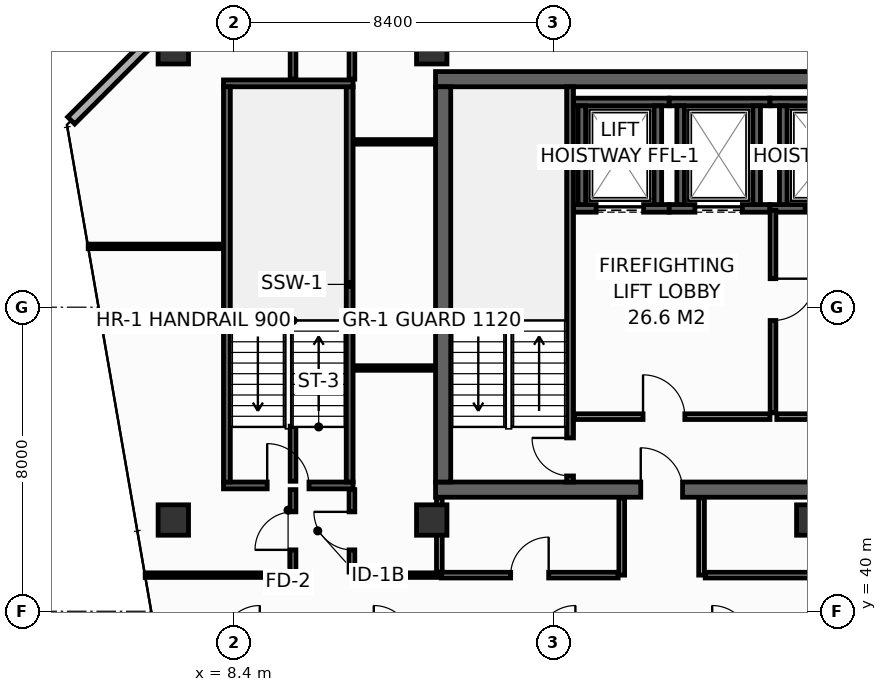
"""IFC4 building model, lengths in metres.
Left out: names, types, materials, properties, quantities, classifications, styles, units other than length and angle.
Written with IfcOpenShell. Run it as: python <this file> out.ifc"""

import sys

from ifc_helpers import new_model, si_unit, direction, frame, frame_2d, origin, origin_2d, place, context, subcontext, project, spatial, rectangle, hollow_rectangle, extrude, element, fill, save


model = new_model("IFC4")
c1 = context("Model", 3, precision=1e-05, world=origin(), true_north=direction((0.0, 1.0)))
c2 = subcontext(c1, "Body", "Model", "MODEL_VIEW")
j1 = project(units=[si_unit("LENGTHUNIT", "METRE"), si_unit("PLANEANGLEUNIT", "RADIAN")], contexts=[c1])
p1 = place(None, origin())
s1 = spatial("IfcSite", under=j1, at=p1, CompositionType="ELEMENT")
p2 = place(p1, origin())
s2 = spatial("IfcBuilding", under=s1, at=p2, CompositionType="ELEMENT")
p3 = place(p2, frame((0.0, 0.0, 234.4)))
s3 = spatial("IfcBuildingStorey", under=s2, at=p3, CompositionType="ELEMENT", Elevation=234.4)
p4 = place(p3, frame((13.7, 43.2, 0.0), z_axis=(0.0, 0.0, 1.0), x_axis=(1.0, 0.0, 0.0)))
e1 = element("IfcWall", 1, at=p4, inside=s3, PredefinedType="SHEAR", context=c2, shape_type="SweptSolid", body=[
    extrude(rectangle(XDim=32.5, YDim=0.4, at=frame_2d((16.25, 0.0))), origin(), (0.0, 0.0, 1.0), 3.55),
])
p5 = place(p4, frame((5.4, 0.0, 0.0)))
e2 = element("IfcOpeningElement", 2, at=p5, cuts=e1, PredefinedType="OPENING", context=c2, shape_type="SweptSolid", body=[
    extrude(rectangle(XDim=1.1, YDim=2.15, at=frame_2d((0.55, 1.075))), frame((0.0, 0.21, 0.0), z_axis=(0.0, -1.0, 0.0), x_axis=(1.0, 0.0, 0.0)), (0.0, 0.0, 1.0), 0.42),
])
p6 = place(p4, frame((25.6, 0.0, 0.0)))
e3 = element("IfcOpeningElement", 3, at=p6, cuts=e1, PredefinedType="OPENING", context=c2, shape_type="SweptSolid", body=[
    extrude(rectangle(XDim=1.1, YDim=2.15, at=frame_2d((0.55, 1.075))), frame((0.0, 0.21, 0.0), z_axis=(0.0, -1.0, 0.0), x_axis=(1.0, 0.0, 0.0)), (0.0, 0.0, 1.0), 0.42),
])
p7 = place(p3, frame((13.7, 54.0, 0.0), z_axis=(0.0, 0.0, 1.0), x_axis=(1.0, 0.0, 0.0)))
e4 = element("IfcWall", 4, at=p7, inside=s3, PredefinedType="SHEAR", context=c2, shape_type="SweptSolid", body=[
    extrude(rectangle(XDim=32.5, YDim=0.4, at=frame_2d((16.25, 0.0))), origin(), (0.0, 0.0, 1.0), 3.55),
])
p8 = place(p3, frame((13.9, 43.4, 0.0), z_axis=(0.0, 0.0, 1.0), x_axis=(0.0, 1.0, 0.0)))
e5 = element("IfcWall", 5, at=p8, inside=s3, PredefinedType="SHEAR", context=c2, shape_type="SweptSolid", body=[
    extrude(rectangle(XDim=10.4, YDim=0.4, at=frame_2d((5.2, 0.0))), origin(), (0.0, 0.0, 1.0), 3.55),
])
for number, where, z_axis, x_axis in (
    (6, (6.8, 54.8, 0.0), (0.0, 0.0, 1.0), (1.0, 0.0, 0.0)),
    (7, (13.6, 54.8, 0.0), (0.0, 0.0, 1.0), (1.0, 0.0, 0.0)),
    (8, (6.8, 42.4, 0.0), (0.0, 0.0, 1.0), (1.0, 0.0, 0.0)),
    (9, (13.6, 42.4, 0.0), (0.0, 0.0, 1.0), (1.0, 0.0, 0.0)),
    (10, (23.6, 42.4, 0.0), (0.0, 0.0, 1.0), (1.0, 0.0, 0.0)),
):
    element("IfcColumn", number, at=place(p3, frame(where, z_axis=z_axis, x_axis=x_axis)), inside=s3, PredefinedType="COLUMN", context=c2, shape_type="SweptSolid", body=[
        extrude(hollow_rectangle(XDim=0.8, YDim=0.8, WallThickness=0.036, at=origin_2d()), origin(), (0.0, 0.0, 1.0), 3.8),
    ])
p9 = place(p3, frame((17.33, 50.6, 0.0), z_axis=(0.0, 0.0, 1.0), x_axis=(1.0, 0.0, 0.0)))
e11 = element("IfcWall", 11, at=p9, inside=s3, PredefinedType="SHEAR", context=c2, shape_type="SweptSolid", body=[
    extrude(rectangle(XDim=2.52, YDim=0.2, at=frame_2d((1.26, 0.0))), origin(), (0.0, 0.0, 1.0), 3.55),
])
p10 = place(p9, frame((0.595, 0.0, 0.0)))
e12 = element("IfcOpeningElement", 12, at=p10, cuts=e11, PredefinedType="OPENING", context=c2, shape_type="SweptSolid", body=[
    extrude(rectangle(XDim=1.25, YDim=2.3, at=frame_2d((0.625, 1.15))), frame((0.0, 0.11, 0.0), z_axis=(0.0, -1.0, 0.0), x_axis=(1.0, 0.0, 0.0)), (0.0, 0.0, 1.0), 0.22),
])
p11 = place(p3, frame((17.33, 53.4, 0.0), z_axis=(0.0, 0.0, 1.0), x_axis=(1.0, 0.0, 0.0)))
e13 = element("IfcWall", 13, at=p11, inside=s3, PredefinedType="SHEAR", context=c2, shape_type="SweptSolid", body=[
    extrude(rectangle(XDim=2.52, YDim=0.2, at=frame_2d((1.26, 0.0))), origin(), (0.0, 0.0, 1.0), 3.55),
])
for number, where, z_axis, x_axis in (
    (14, (17.55, 50.7, 0.0), (0.0, 0.0, 1.0), (0.0, 1.0, 0.0)),
    (15, (19.55, 50.7, 0.0), (0.0, 0.0, 1.0), (0.0, 1.0, 0.0)),
):
    element("IfcWall", number, at=place(p3, frame(where, z_axis=z_axis, x_axis=x_axis)), inside=s3, PredefinedType="SHEAR", context=c2, shape_type="SweptSolid", body=[
        extrude(rectangle(XDim=2.6, YDim=0.2, at=frame_2d((1.3, 0.0))), origin(), (0.0, 0.0, 1.0), 3.55),
    ])
p12 = place(p3, frame((19.85, 50.6, 0.0), z_axis=(0.0, 0.0, 1.0), x_axis=(1.0, 0.0, 0.0)))
e16 = element("IfcWall", 16, at=p12, inside=s3, PredefinedType="SHEAR", context=c2, shape_type="SweptSolid", body=[
    extrude(rectangle(XDim=2.65, YDim=0.2, at=frame_2d((1.325, 0.0))), origin(), (0.0, 0.0, 1.0), 3.55),
])
p13 = place(p12, frame((0.675, 0.0, 0.0)))
e17 = element("IfcOpeningElement", 17, at=p13, cuts=e16, PredefinedType="OPENING", context=c2, shape_type="SweptSolid", body=[
    extrude(rectangle(XDim=1.25, YDim=2.3, at=frame_2d((0.625, 1.15))), frame((0.0, 0.11, 0.0), z_axis=(0.0, -1.0, 0.0), x_axis=(1.0, 0.0, 0.0)), (0.0, 0.0, 1.0), 0.22),
])
p14 = place(p3, frame((19.85, 53.4, 0.0), z_axis=(0.0, 0.0, 1.0), x_axis=(1.0, 0.0, 0.0)))
e18 = element("IfcWall", 18, at=p14, inside=s3, PredefinedType="SHEAR", context=c2, shape_type="SweptSolid", body=[
    extrude(rectangle(XDim=2.65, YDim=0.2, at=frame_2d((1.325, 0.0))), origin(), (0.0, 0.0, 1.0), 3.55),
])
for number, where, z_axis, x_axis in (
    (19, (20.15, 50.7, 0.0), (0.0, 0.0, 1.0), (0.0, 1.0, 0.0)),
    (20, (22.15, 50.7, 0.0), (0.0, 0.0, 1.0), (0.0, 1.0, 0.0)),
):
    element("IfcWall", number, at=place(p3, frame(where, z_axis=z_axis, x_axis=x_axis)), inside=s3, PredefinedType="SHEAR", context=c2, shape_type="SweptSolid", body=[
        extrude(rectangle(XDim=2.6, YDim=0.2, at=frame_2d((1.3, 0.0))), origin(), (0.0, 0.0, 1.0), 3.55),
    ])
p15 = place(p3, frame((22.5, 50.6, 0.0), z_axis=(0.0, 0.0, 1.0), x_axis=(1.0, 0.0, 0.0)))
e21 = element("IfcWall", 21, at=p15, inside=s3, PredefinedType="SHEAR", context=c2, shape_type="SweptSolid", body=[
    extrude(rectangle(XDim=2.85, YDim=0.2, at=frame_2d((1.425, 0.0))), origin(), (0.0, 0.0, 1.0), 3.55),
])
p16 = place(p15, frame((0.925, 0.0, 0.0)))
e22 = element("IfcOpeningElement", 22, at=p16, cuts=e21, PredefinedType="OPENING", context=c2, shape_type="SweptSolid", body=[
    extrude(rectangle(XDim=1.25, YDim=2.3, at=frame_2d((0.625, 1.15))), frame((0.0, 0.11, 0.0), z_axis=(0.0, -1.0, 0.0), x_axis=(1.0, 0.0, 0.0)), (0.0, 0.0, 1.0), 0.22),
])
p17 = place(p3, frame((22.5, 53.4, 0.0), z_axis=(0.0, 0.0, 1.0), x_axis=(1.0, 0.0, 0.0)))
e23 = element("IfcWall", 23, at=p17, inside=s3, PredefinedType="SHEAR", context=c2, shape_type="SweptSolid", body=[
    extrude(rectangle(XDim=2.85, YDim=0.2, at=frame_2d((1.425, 0.0))), origin(), (0.0, 0.0, 1.0), 3.55),
])
p18 = place(p3, frame((22.85, 50.7, 0.0), z_axis=(0.0, 0.0, 1.0), x_axis=(0.0, 1.0, 0.0)))
e24 = element("IfcWall", 24, at=p18, inside=s3, PredefinedType="SHEAR", context=c2, shape_type="SweptSolid", body=[
    extrude(rectangle(XDim=2.6, YDim=0.2, at=frame_2d((1.3, 0.0))), origin(), (0.0, 0.0, 1.0), 3.55),
])
p19 = place(p3, frame((17.24, 43.4, 0.0), z_axis=(0.0, 0.0, 1.0), x_axis=(0.0, 1.0, 0.0)))
e25 = element("IfcWall", 25, at=p19, inside=s3, PredefinedType="SHEAR", context=c2, shape_type="SweptSolid", body=[
    extrude(rectangle(XDim=10.4, YDim=0.18, at=frame_2d((5.2, 0.0))), origin(), (0.0, 0.0, 1.0), 3.55),
])
p20 = place(p19, frame((0.16, 0.0, 0.0)))
e26 = element("IfcOpeningElement", 26, at=p20, cuts=e25, PredefinedType="OPENING", context=c2, shape_type="SweptSolid", body=[
    extrude(rectangle(XDim=1.0, YDim=2.15, at=frame_2d((0.5, 1.075))), frame((0.0, 0.1, 0.0), z_axis=(0.0, -1.0, 0.0), x_axis=(1.0, 0.0, 0.0)), (0.0, 0.0, 1.0), 0.2),
])
p21 = place(p3, frame((8.12, 43.31, 0.0), z_axis=(0.0, 0.0, 1.0), x_axis=(1.0, 0.0, 0.0)))
e27 = element("IfcWall", 27, at=p21, inside=s3, PredefinedType="SHEAR", context=c2, shape_type="SweptSolid", body=[
    extrude(rectangle(XDim=3.41, YDim=0.18, at=frame_2d((1.705, 0.0))), origin(), (0.0, 0.0, 1.0), 3.55),
])
p22 = place(p21, frame((1.15, 0.0, 0.0)))
e28 = element("IfcOpeningElement", 28, at=p22, cuts=e27, PredefinedType="OPENING", context=c2, shape_type="SweptSolid", body=[
    extrude(rectangle(XDim=1.1, YDim=2.15, at=frame_2d((0.55, 1.075))), frame((0.0, 0.1, 0.0), z_axis=(0.0, -1.0, 0.0), x_axis=(1.0, 0.0, 0.0)), (0.0, 0.0, 1.0), 0.2),
])
p23 = place(p3, frame((11.44, 43.4, 0.0), z_axis=(0.0, 0.0, 1.0), x_axis=(0.0, 1.0, 0.0)))
e29 = element("IfcWall", 29, at=p23, inside=s3, PredefinedType="SHEAR", context=c2, shape_type="SweptSolid", body=[
    extrude(rectangle(XDim=10.4, YDim=0.18, at=frame_2d((5.2, 0.0))), origin(), (0.0, 0.0, 1.0), 3.55),
])
p24 = place(p3, frame((11.53, 53.89, 0.0), z_axis=(0.0, 0.0, 1.0), x_axis=(-1.0, 0.0, 0.0)))
e30 = element("IfcWall", 30, at=p24, inside=s3, PredefinedType="SHEAR", context=c2, shape_type="SweptSolid", body=[
    extrude(rectangle(XDim=3.41, YDim=0.18, at=frame_2d((1.705, 0.0))), origin(), (0.0, 0.0, 1.0), 3.55),
])
p25 = place(p3, frame((8.21, 53.8, 0.0), z_axis=(0.0, 0.0, 1.0), x_axis=(0.0, -1.0, 0.0)))
e31 = element("IfcWall", 31, at=p25, inside=s3, PredefinedType="SHEAR", context=c2, shape_type="SweptSolid", body=[
    extrude(rectangle(XDim=10.4, YDim=0.18, at=frame_2d((5.2, 0.0))), origin(), (0.0, 0.0, 1.0), 3.55),
])
p26 = place(p3, frame((17.36, 45.12, 0.0), z_axis=(0.0, 0.0, 1.0), x_axis=(1.0, 0.0, 0.0)))
e32 = element("IfcWall", 32, at=p26, inside=s3, PredefinedType="PARTITIONING", context=c2, shape_type="SweptSolid", body=[
    extrude(rectangle(XDim=5.14, YDim=0.15, at=frame_2d((2.57, 0.0))), origin(), (0.0, 0.0, 1.0), 3.55),
])
p27 = place(p26, frame((1.8, 0.0, 0.0)))
e33 = element("IfcOpeningElement", 33, at=p27, cuts=e32, PredefinedType="OPENING", context=c2, shape_type="SweptSolid", body=[
    extrude(rectangle(XDim=1.1, YDim=2.15, at=frame_2d((0.55, 1.075))), frame((0.0, 0.085, 0.0), z_axis=(0.0, -1.0, 0.0), x_axis=(1.0, 0.0, 0.0)), (0.0, 0.0, 1.0), 0.17),
])
p28 = place(p3, frame((22.58, 50.55, 0.0), z_axis=(0.0, 0.0, 1.0), x_axis=(0.0, -1.0, 0.0)))
e34 = element("IfcWall", 34, at=p28, inside=s3, PredefinedType="PARTITIONING", context=c2, shape_type="SweptSolid", body=[
    extrude(rectangle(XDim=5.33, YDim=0.15, at=frame_2d((2.665, 0.0))), origin(), (0.0, 0.0, 1.0), 3.55),
])
p29 = place(p28, frame((1.8, 0.0, 0.0)))
e35 = element("IfcOpeningElement", 35, at=p29, cuts=e34, PredefinedType="OPENING", context=c2, shape_type="SweptSolid", body=[
    extrude(rectangle(XDim=1.1, YDim=2.15, at=frame_2d((0.55, 1.075))), frame((0.0, 0.085, 0.0), z_axis=(0.0, -1.0, 0.0), x_axis=(1.0, 0.0, 0.0)), (0.0, 0.0, 1.0), 0.17),
])
p30 = place(p3, frame((22.68, 45.12, 0.0), z_axis=(0.0, 0.0, 1.0), x_axis=(1.0, 0.0, 0.0)))
e36 = element("IfcWall", 36, at=p30, inside=s3, PredefinedType="PARTITIONING", context=c2, shape_type="SweptSolid", body=[
    extrude(rectangle(XDim=2.92, YDim=0.15, at=frame_2d((1.46, 0.0))), origin(), (0.0, 0.0, 1.0), 3.55),
])
p31 = place(p30, frame((0.85, 0.0, 0.0)))
e37 = element("IfcOpeningElement", 37, at=p31, cuts=e36, PredefinedType="OPENING", context=c2, shape_type="SweptSolid", body=[
    extrude(rectangle(XDim=1.1, YDim=2.15, at=frame_2d((0.55, 1.075))), frame((0.0, 0.085, 0.0), z_axis=(0.0, -1.0, 0.0), x_axis=(1.0, 0.0, 0.0)), (0.0, 0.0, 1.0), 0.17),
])
p32 = place(p3, frame((7.087, 55.887, 0.0), z_axis=(0.0, 0.0, 1.0), x_axis=(-0.707106781187, -0.707106781187, 0.0)))
e38 = element("IfcWall", 38, at=p32, inside=s3, PredefinedType="STANDARD", context=c2, shape_type="SweptSolid", body=[
    extrude(rectangle(XDim=4.206, YDim=0.26, at=frame_2d((2.103, 0.0))), origin(), (0.0, 0.0, 1.0), 3.55),
])
p33 = place(p3, frame((6.059, 40.95, 0.0), z_axis=(0.0, 0.0, 1.0), x_axis=(1.0, 0.0, 0.0)))
e39 = element("IfcWall", 39, at=p33, inside=s3, PredefinedType="PARTITIONING", context=c2, shape_type="SweptSolid", body=[
    extrude(rectangle(XDim=3.891, YDim=0.12, at=frame_2d((1.945, 0.0))), origin(), (0.0, 0.0, 1.0), 3.085),
])
p34 = place(p3, frame((11.5, 40.95, 0.0), z_axis=(0.0, 0.0, 1.0), x_axis=(1.0, 0.0, 0.0)))
e40 = element("IfcWall", 40, at=p34, inside=s3, PredefinedType="PARTITIONING", context=c2, shape_type="SweptSolid", body=[
    extrude(rectangle(XDim=2.35, YDim=0.12, at=frame_2d((1.175, 0.0))), origin(), (0.0, 0.0, 1.0), 3.55),
])
p35 = place(p3, frame((11.55, 52.35, 0.0), z_axis=(0.0, 0.0, 1.0), x_axis=(1.0, 0.0, 0.0)))
e41 = element("IfcWall", 41, at=p35, inside=s3, PredefinedType="PARTITIONING", context=c2, shape_type="SweptSolid", body=[
    extrude(rectangle(XDim=2.13, YDim=0.12, at=frame_2d((1.065, 0.0))), origin(), (0.0, 0.0, 1.0), 3.55),
])
p36 = place(p3, frame((11.5, 54.0, 0.0), z_axis=(0.0, 0.0, 1.0), x_axis=(0.0, 1.0, 0.0)))
e42 = element("IfcWall", 42, at=p36, inside=s3, PredefinedType="PARTITIONING", context=c2, shape_type="SweptSolid", body=[
    extrude(rectangle(XDim=1.995, YDim=0.15, at=frame_2d((0.998, 0.0))), origin(), (0.0, 0.0, 1.0), 2.935),
])
p37 = place(p3, frame((4.56, 49.6, 0.0), z_axis=(0.0, 0.0, 1.0), x_axis=(1.0, 0.0, 0.0)))
e43 = element("IfcWall", 43, at=p37, inside=s3, PredefinedType="PARTITIONING", context=c2, shape_type="SweptSolid", body=[
    extrude(rectangle(XDim=3.54, YDim=0.12, at=frame_2d((1.77, 0.0))), origin(), (0.0, 0.0, 1.0), 2.947),
])
p38 = place(p3, frame((9.95, 41.03, 0.0), z_axis=(0.0, 0.0, 1.0), x_axis=(0.0, 1.0, 0.0)))
e44 = element("IfcWall", 44, at=p38, inside=s3, PredefinedType="PARTITIONING", context=c2, shape_type="SweptSolid", body=[
    extrude(rectangle(XDim=2.17, YDim=0.15, at=frame_2d((1.085, 0.0))), origin(), (0.0, 0.0, 1.0), 2.947),
])
p39 = place(p38, frame((0.585, 0.0, 0.0)))
e45 = element("IfcOpeningElement", 45, at=p39, cuts=e44, PredefinedType="OPENING", context=c2, shape_type="SweptSolid", body=[
    extrude(rectangle(XDim=1.0, YDim=2.15, at=frame_2d((0.5, 1.075))), frame((0.0, 0.085, 0.0), z_axis=(0.0, -1.0, 0.0), x_axis=(1.0, 0.0, 0.0)), (0.0, 0.0, 1.0), 0.17),
])
p40 = place(p3, frame((9.95, 43.42, 0.0), z_axis=(0.0, 0.0, 1.0), x_axis=(0.0, 1.0, 0.0)))
e46 = element("IfcWall", 46, at=p40, inside=s3, PredefinedType="PARTITIONING", context=c2, shape_type="SweptSolid", body=[
    extrude(rectangle(XDim=1.45, YDim=0.15, at=frame_2d((0.725, 0.0))), origin(), (0.0, 0.0, 1.0), 3.55),
])
p41 = place(p3, frame((9.95, 54.0, 0.0), z_axis=(0.0, 0.0, 1.0), x_axis=(0.0, 1.0, 0.0)))
e47 = element("IfcWall", 47, at=p41, inside=s3, PredefinedType="PARTITIONING", context=c2, shape_type="SweptSolid", body=[
    extrude(rectangle(XDim=1.995, YDim=0.15, at=frame_2d((0.998, 0.0))), origin(), (0.0, 0.0, 1.0), 2.935),
])
p42 = place(p3, frame((11.55, 46.4, 0.0), z_axis=(0.0, 0.0, 1.0), x_axis=(1.0, 0.0, 0.0)))
e48 = element("IfcWall", 48, at=p42, inside=s3, PredefinedType="PARTITIONING", context=c2, shape_type="SweptSolid", body=[
    extrude(rectangle(XDim=2.13, YDim=0.12, at=frame_2d((1.065, 0.0))), origin(), (0.0, 0.0, 1.0), 3.55),
])
p43 = place(p3, frame((11.5, 41.03, 0.0), z_axis=(0.0, 0.0, 1.0), x_axis=(0.0, 1.0, 0.0)))
e49 = element("IfcWall", 49, at=p43, inside=s3, PredefinedType="PARTITIONING", context=c2, shape_type="SweptSolid", body=[
    extrude(rectangle(XDim=2.17, YDim=0.15, at=frame_2d((1.085, 0.0))), origin(), (0.0, 0.0, 1.0), 2.947),
])
p44 = place(p43, frame((0.585, 0.0, 0.0)))
e50 = element("IfcOpeningElement", 50, at=p44, cuts=e49, PredefinedType="OPENING", context=c2, shape_type="SweptSolid", body=[
    extrude(rectangle(XDim=1.0, YDim=2.15, at=frame_2d((0.5, 1.075))), frame((0.0, 0.085, 0.0), z_axis=(0.0, -1.0, 0.0), x_axis=(1.0, 0.0, 0.0)), (0.0, 0.0, 1.0), 0.17),
])
p45 = place(p3, frame((13.8, 41.03, 0.0), z_axis=(0.0, 0.0, 1.0), x_axis=(0.0, 1.0, 0.0)))
e51 = element("IfcWall", 51, at=p45, inside=s3, PredefinedType="PARTITIONING", context=c2, shape_type="SweptSolid", body=[
    extrude(rectangle(XDim=1.95, YDim=0.15, at=frame_2d((0.975, 0.0))), origin(), (0.0, 0.0, 1.0), 3.55),
])
for number, where, z_axis, x_axis in (
    (52, (18.6, 40.95, 0.0), (0.0, 0.0, 1.0), (0.0, 1.0, 0.0)),
    (53, (20.7, 40.95, 0.0), (0.0, 0.0, 1.0), (0.0, 1.0, 0.0)),
):
    element("IfcWall", number, at=place(p3, frame(where, z_axis=z_axis, x_axis=x_axis)), inside=s3, PredefinedType="PARTITIONING", context=c2, shape_type="SweptSolid", body=[
        extrude(rectangle(XDim=2.03, YDim=0.15, at=frame_2d((1.015, 0.0))), origin(), (0.0, 0.0, 1.0), 3.55),
    ])
p46 = place(p3, frame((13.85, 40.95, 0.0), z_axis=(0.0, 0.0, 1.0), x_axis=(1.0, 0.0, 0.0)))
e54 = element("IfcWall", 54, at=p46, inside=s3, PredefinedType="PARTITIONING", context=c2, shape_type="SweptSolid", body=[
    extrude(rectangle(XDim=4.655, YDim=0.15, at=frame_2d((2.327, 0.0))), origin(), (0.0, 0.0, 1.0), 3.55),
])
p47 = place(p46, frame((1.827, 0.0, 0.0)))
e55 = element("IfcOpeningElement", 55, at=p47, cuts=e54, PredefinedType="OPENING", context=c2, shape_type="SweptSolid", body=[
    extrude(rectangle(XDim=1.0, YDim=2.15, at=frame_2d((0.5, 1.075))), frame((0.0, 0.085, 0.0), z_axis=(0.0, -1.0, 0.0), x_axis=(1.0, 0.0, 0.0)), (0.0, 0.0, 1.0), 0.17),
])
p48 = place(p3, frame((20.795, 40.95, 0.0), z_axis=(0.0, 0.0, 1.0), x_axis=(1.0, 0.0, 0.0)))
e56 = element("IfcWall", 56, at=p48, inside=s3, PredefinedType="PARTITIONING", context=c2, shape_type="SweptSolid", body=[
    extrude(rectangle(XDim=9.125, YDim=0.15, at=frame_2d((4.562, 0.0))), origin(), (0.0, 0.0, 1.0), 2.947),
])
p49 = place(p48, frame((4.062, 0.0, 0.0)))
e57 = element("IfcOpeningElement", 57, at=p49, cuts=e56, PredefinedType="OPENING", context=c2, shape_type="SweptSolid", body=[
    extrude(rectangle(XDim=1.0, YDim=2.15, at=frame_2d((0.5, 1.075))), frame((0.0, 0.085, 0.0), z_axis=(0.0, -1.0, 0.0), x_axis=(1.0, 0.0, 0.0)), (0.0, 0.0, 1.0), 0.17),
])
p50 = place(p10, origin())
e58 = element("IfcDoor", 58, at=p50, inside=s3, OperationType="SLIDING_TO_LEFT", PredefinedType="DOOR", context=c2, shape_type="SweptSolid", body=[
    extrude(rectangle(XDim=1.25, YDim=2.3, at=frame_2d((0.625, 1.15))), frame((0.0, 0.025, 0.0), z_axis=(0.0, -1.0, 0.0), x_axis=(1.0, 0.0, 0.0)), (0.0, 0.0, 1.0), 0.05),
])
fill(e12, e58)
p51 = place(p13, origin())
e59 = element("IfcDoor", 59, at=p51, inside=s3, OperationType="SLIDING_TO_LEFT", PredefinedType="DOOR", context=c2, shape_type="SweptSolid", body=[
    extrude(rectangle(XDim=1.25, YDim=2.3, at=frame_2d((0.625, 1.15))), frame((0.0, 0.025, 0.0), z_axis=(0.0, -1.0, 0.0), x_axis=(1.0, 0.0, 0.0)), (0.0, 0.0, 1.0), 0.05),
])
fill(e17, e59)
p52 = place(p16, origin())
e60 = element("IfcDoor", 60, at=p52, inside=s3, OperationType="SLIDING_TO_LEFT", PredefinedType="DOOR", context=c2, shape_type="SweptSolid", body=[
    extrude(rectangle(XDim=1.25, YDim=2.3, at=frame_2d((0.625, 1.15))), frame((0.0, 0.025, 0.0), z_axis=(0.0, -1.0, 0.0), x_axis=(1.0, 0.0, 0.0)), (0.0, 0.0, 1.0), 0.05),
])
fill(e22, e60)
p53 = place(p20, origin())
e61 = element("IfcDoor", 61, at=p53, inside=s3, OperationType="SINGLE_SWING_RIGHT", PredefinedType="DOOR", context=c2, shape_type="SweptSolid", body=[
    extrude(rectangle(XDim=1.0, YDim=2.15, at=frame_2d((0.5, 1.075))), frame((0.0, 0.025, 0.0), z_axis=(0.0, -1.0, 0.0), x_axis=(1.0, 0.0, 0.0)), (0.0, 0.0, 1.0), 0.05),
])
fill(e26, e61)
p54 = place(p22, origin())
e62 = element("IfcDoor", 62, at=p54, inside=s3, OperationType="SINGLE_SWING_LEFT", PredefinedType="DOOR", context=c2, shape_type="SweptSolid", body=[
    extrude(rectangle(XDim=1.1, YDim=2.15, at=frame_2d((0.55, 1.075))), frame((0.0, 0.025, 0.0), z_axis=(0.0, -1.0, 0.0), x_axis=(1.0, 0.0, 0.0)), (0.0, 0.0, 1.0), 0.05),
])
fill(e28, e62)
p55 = place(p27, origin())
e63 = element("IfcDoor", 63, at=p55, inside=s3, OperationType="SINGLE_SWING_LEFT", PredefinedType="DOOR", context=c2, shape_type="SweptSolid", body=[
    extrude(rectangle(XDim=1.1, YDim=2.15, at=frame_2d((0.55, 1.075))), frame((0.0, 0.025, 0.0), z_axis=(0.0, -1.0, 0.0), x_axis=(1.0, 0.0, 0.0)), (0.0, 0.0, 1.0), 0.05),
])
fill(e33, e63)
p56 = place(p29, origin())
e64 = element("IfcDoor", 64, at=p56, inside=s3, OperationType="SINGLE_SWING_LEFT", PredefinedType="DOOR", context=c2, shape_type="SweptSolid", body=[
    extrude(rectangle(XDim=1.1, YDim=2.15, at=frame_2d((0.55, 1.075))), frame((0.0, 0.025, 0.0), z_axis=(0.0, -1.0, 0.0), x_axis=(1.0, 0.0, 0.0)), (0.0, 0.0, 1.0), 0.05),
])
fill(e35, e64)
p57 = place(p5, origin())
e65 = element("IfcDoor", 65, at=p57, inside=s3, OperationType="SINGLE_SWING_LEFT", PredefinedType="DOOR", context=c2, shape_type="SweptSolid", body=[
    extrude(rectangle(XDim=1.1, YDim=2.15, at=frame_2d((0.55, 1.075))), frame((0.0, 0.025, 0.0), z_axis=(0.0, -1.0, 0.0), x_axis=(1.0, 0.0, 0.0)), (0.0, 0.0, 1.0), 0.05),
])
fill(e2, e65)
p58 = place(p39, origin())
e66 = element("IfcDoor", 66, at=p58, inside=s3, OperationType="SINGLE_SWING_LEFT", PredefinedType="DOOR", context=c2, shape_type="SweptSolid", body=[
    extrude(rectangle(XDim=1.0, YDim=2.15, at=frame_2d((0.5, 1.075))), frame((0.0, 0.025, 0.0), z_axis=(0.0, -1.0, 0.0), x_axis=(1.0, 0.0, 0.0)), (0.0, 0.0, 1.0), 0.05),
])
fill(e45, e66)
p59 = place(p44, origin())
e67 = element("IfcDoor", 67, at=p59, inside=s3, OperationType="SINGLE_SWING_RIGHT", PredefinedType="DOOR", context=c2, shape_type="SweptSolid", body=[
    extrude(rectangle(XDim=1.0, YDim=2.15, at=frame_2d((0.5, 1.075))), frame((0.0, 0.025, 0.0), z_axis=(0.0, -1.0, 0.0), x_axis=(1.0, 0.0, 0.0)), (0.0, 0.0, 1.0), 0.05),
])
fill(e50, e67)
p60 = place(p47, origin())
e68 = element("IfcDoor", 68, at=p60, inside=s3, OperationType="SINGLE_SWING_RIGHT", PredefinedType="DOOR", context=c2, shape_type="SweptSolid", body=[
    extrude(rectangle(XDim=1.0, YDim=2.15, at=frame_2d((0.5, 1.075))), frame((0.0, 0.025, 0.0), z_axis=(0.0, -1.0, 0.0), x_axis=(1.0, 0.0, 0.0)), (0.0, 0.0, 1.0), 0.05),
])
fill(e55, e68)
save(model, sys.argv[1])
